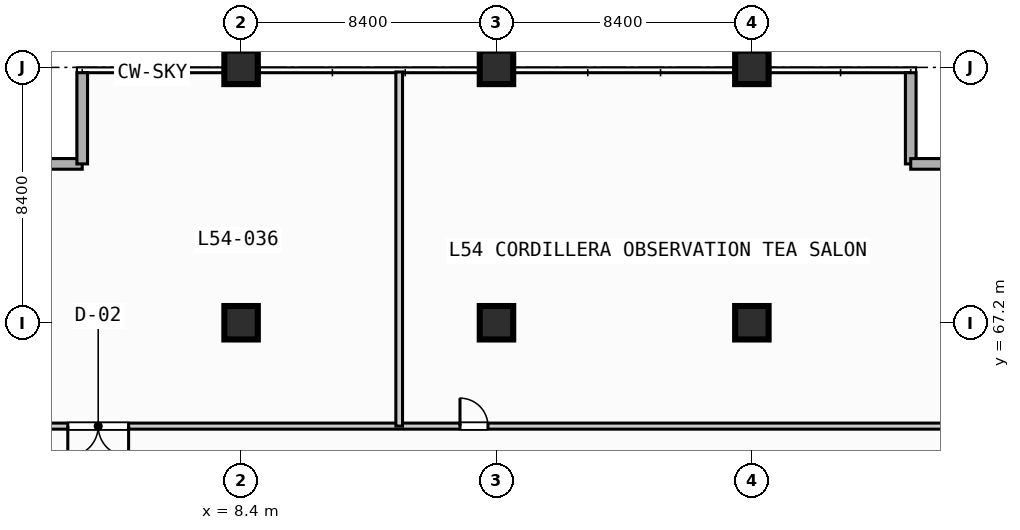
"""IFC4 building model, lengths in metres.
Left out: names, types, materials, properties, quantities, classifications, styles, units other than length and angle.
Written with IfcOpenShell. Run it as: python <this file> out.ifc"""

import sys

from ifc_helpers import new_model, si_unit, direction, frame, frame_2d, origin, origin_2d, place, context, subcontext, project, spatial, rectangle, extrude, element, fill, save


model = new_model("IFC4")
c1 = context("Model", 3, precision=1e-05, world=origin(), true_north=direction((0.0, 1.0)))
c2 = subcontext(c1, "Body", "Model", "MODEL_VIEW")
j1 = project(units=[si_unit("LENGTHUNIT", "METRE"), si_unit("PLANEANGLEUNIT", "RADIAN")], contexts=[c1])
p1 = place(None, origin())
s1 = spatial("IfcSite", under=j1, at=p1, CompositionType="ELEMENT")
p2 = place(p1, origin())
s2 = spatial("IfcBuilding", under=s1, at=p2, CompositionType="ELEMENT")
p3 = place(p2, frame((0.0, 0.0, 219.8)))
s3 = spatial("IfcBuildingStorey", under=s2, at=p3, CompositionType="ELEMENT", Elevation=219.8)
for number, where, z_axis, x_axis in (
    (1, (8.4, 67.2, 0.0), (0.0, 0.0, 1.0), (1.0, 0.0, 0.0)),
    (2, (8.4, 75.6, 0.0), (0.0, 0.0, 1.0), (1.0, 0.0, 0.0)),
    (3, (16.8, 67.2, 0.0), (0.0, 0.0, 1.0), (1.0, 0.0, 0.0)),
    (4, (16.8, 75.6, 0.0), (0.0, 0.0, 1.0), (1.0, 0.0, 0.0)),
    (5, (25.2, 67.2, 0.0), (0.0, 0.0, 1.0), (1.0, 0.0, 0.0)),
    (6, (25.2, 75.6, 0.0), (0.0, 0.0, 1.0), (1.0, 0.0, 0.0)),
):
    element("IfcColumn", number, at=place(p3, frame(where, z_axis=z_axis, x_axis=x_axis)), inside=s3, PredefinedType="COLUMN", context=c2, shape_type="SweptSolid", body=[
        extrude(rectangle(XDim=1.1, YDim=1.1, at=origin_2d()), origin(), (0.0, 0.0, 1.0), 4.2),
    ])
for number, where, z_axis, x_axis in (
    (7, (0.175, 72.425, 0.0), (0.0, 0.0, 1.0), (1.0, 0.0, 0.0)),
    (8, (3.175, 72.425, 0.0), (0.0, 0.0, 1.0), (0.0, 1.0, 0.0)),
    (9, (30.425, 75.425, 0.0), (0.0, 0.0, 1.0), (0.0, -1.0, 0.0)),
    (10, (30.425, 72.425, 0.0), (0.0, 0.0, 1.0), (1.0, 0.0, 0.0)),
):
    element("IfcWall", number, at=place(p3, frame(where, z_axis=z_axis, x_axis=x_axis)), inside=s3, PredefinedType="STANDARD", context=c2, shape_type="SweptSolid", body=[
        extrude(rectangle(XDim=3.0, YDim=0.35, at=frame_2d((1.5, 0.0))), origin(), (0.0, 0.0, 1.0), 3.97),
    ])
p4 = place(p3, frame((0.3, 63.8, 0.0), z_axis=(0.0, 0.0, 1.0), x_axis=(1.0, 0.0, 0.0)))
e11 = element("IfcWall", 11, at=p4, inside=s3, PredefinedType="PARTITIONING", context=c2, shape_type="SweptSolid", body=[
    extrude(rectangle(XDim=33.0, YDim=0.2, at=frame_2d((16.5, 0.0))), origin(), (0.0, 0.0, 1.0), 3.97),
])
p5 = place(p4, frame((2.4, 0.0, 0.0)))
e12 = element("IfcOpeningElement", 12, at=p5, cuts=e11, PredefinedType="OPENING", context=c2, shape_type="SweptSolid", body=[
    extrude(rectangle(XDim=2.0, YDim=2.15, at=frame_2d((1.0, 1.075))), frame((0.0, 0.11, 0.0), z_axis=(0.0, -1.0, 0.0), x_axis=(1.0, 0.0, 0.0)), (0.0, 0.0, 1.0), 0.22),
])
p6 = place(p4, frame((15.3, 0.0, 0.0)))
e13 = element("IfcOpeningElement", 13, at=p6, cuts=e11, PredefinedType="OPENING", context=c2, shape_type="SweptSolid", body=[
    extrude(rectangle(XDim=0.92, YDim=2.1, at=frame_2d((0.46, 1.05))), frame((0.0, 0.11, 0.0), z_axis=(0.0, -1.0, 0.0), x_axis=(1.0, 0.0, 0.0)), (0.0, 0.0, 1.0), 0.22),
])
p7 = place(p3, frame((13.6, 63.8, 0.0), z_axis=(0.0, 0.0, 1.0), x_axis=(0.0, 1.0, 0.0)))
e14 = element("IfcWall", 14, at=p7, inside=s3, PredefinedType="PARTITIONING", context=c2, shape_type="SweptSolid", body=[
    extrude(rectangle(XDim=11.65, YDim=0.22, at=frame_2d((5.825, 0.0))), origin(), (0.0, 0.0, 1.0), 3.97),
])
p8 = place(p5, origin())
e15 = element("IfcDoor", 15, at=p8, inside=s3, OperationType="SINGLE_SWING_RIGHT", PredefinedType="DOOR", context=c2, shape_type="SweptSolid", body=[
    extrude(rectangle(XDim=2.0, YDim=2.15, at=frame_2d((1.0, 1.075))), frame((0.0, 0.025, 0.0), z_axis=(0.0, -1.0, 0.0), x_axis=(1.0, 0.0, 0.0)), (0.0, 0.0, 1.0), 0.05),
])
fill(e12, e15)
p9 = place(p6, origin())
e16 = element("IfcDoor", 16, at=p9, inside=s3, OperationType="SINGLE_SWING_LEFT", PredefinedType="DOOR", context=c2, shape_type="SweptSolid", body=[
    extrude(rectangle(XDim=0.92, YDim=2.1, at=frame_2d((0.46, 1.05))), frame((0.0, 0.025, 0.0), z_axis=(0.0, -1.0, 0.0), x_axis=(1.0, 0.0, 0.0)), (0.0, 0.0, 1.0), 0.05),
])
fill(e13, e16)
save(model, sys.argv[1])
